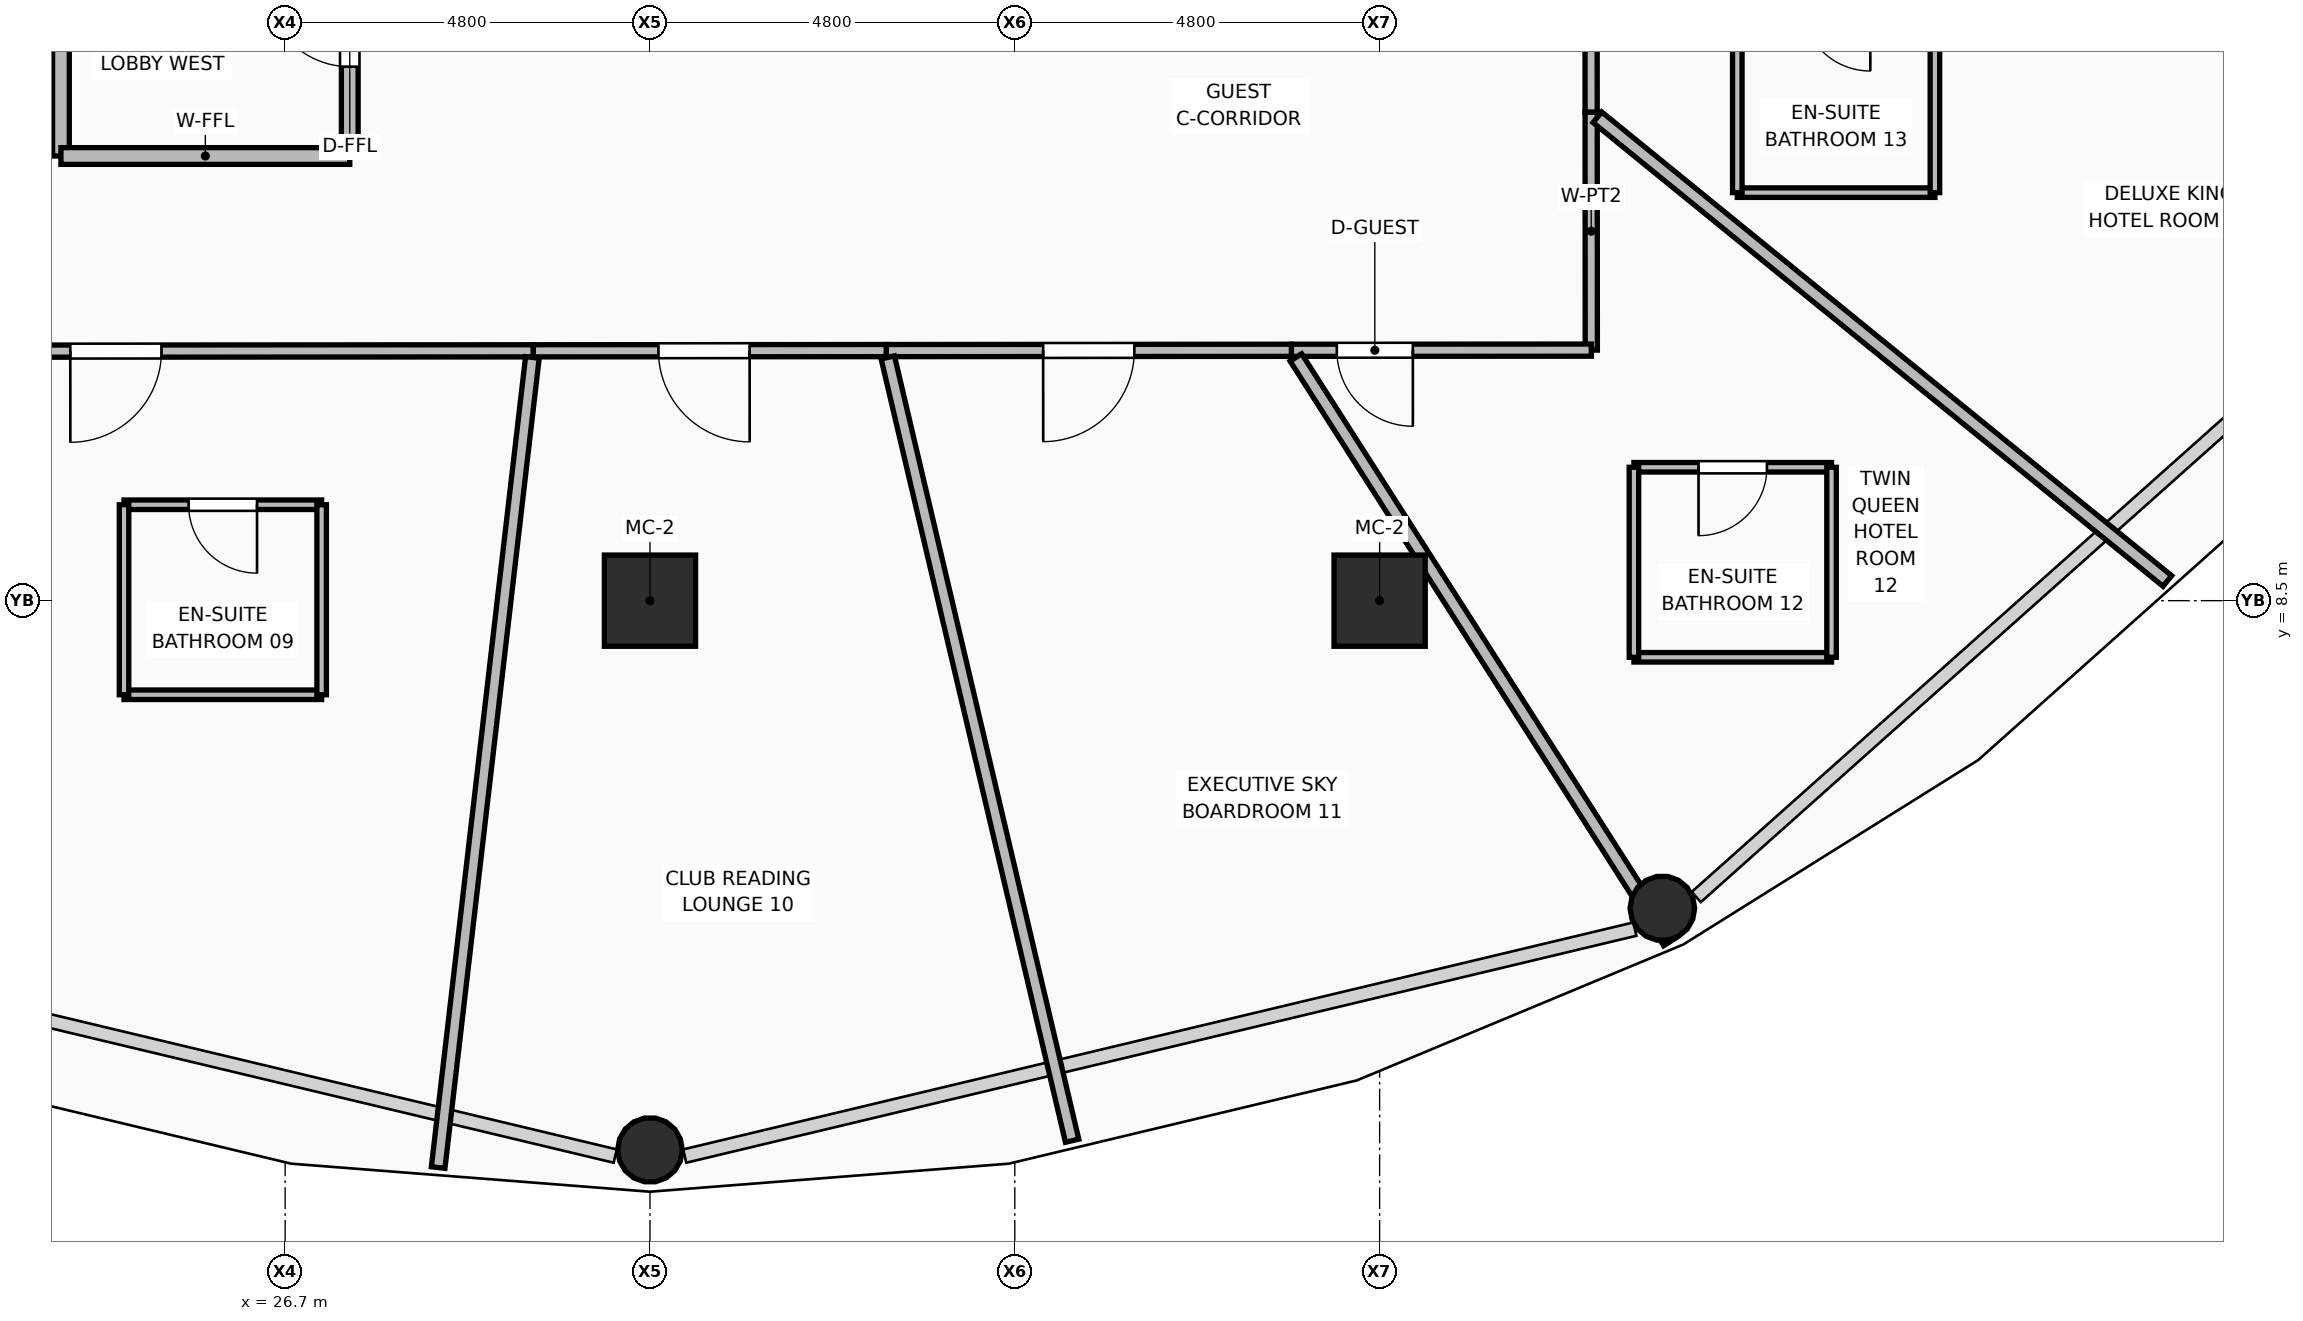
"""IFC4 building model, lengths in metres.
Left out: names, types, materials, properties, quantities, classifications, styles, units other than length and angle.
Written with IfcOpenShell. Run it as: python <this file> out.ifc"""

import sys

from ifc_helpers import new_model, si_unit, direction, frame, frame_2d, origin, origin_2d, place, context, subcontext, project, spatial, rectangle, hollow_rectangle, hollow_circle, extrude, element, fill, save


model = new_model("IFC4")
c1 = context("Model", 3, precision=1e-05, world=origin(), true_north=direction((0.0, 1.0)))
c2 = subcontext(c1, "Body", "Model", "MODEL_VIEW")
j1 = project(units=[si_unit("LENGTHUNIT", "METRE"), si_unit("PLANEANGLEUNIT", "RADIAN")], contexts=[c1])
p1 = place(None, origin())
s1 = spatial("IfcSite", under=j1, at=p1, CompositionType="ELEMENT")
p2 = place(p1, origin())
s2 = spatial("IfcBuilding", under=s1, at=p2, CompositionType="ELEMENT")
p3 = place(p2, frame((0.0, 0.0, 49.5)))
s3 = spatial("IfcBuildingStorey", under=s2, at=p3, CompositionType="ELEMENT", Elevation=49.5)
for number, where, z_axis, x_axis in (
    (1, (31.5, 8.5, 0.0), (0.0, 0.0, 1.0), (1.0, 0.0, 0.0)),
    (2, (41.1, 8.5, 0.0), (0.0, 0.0, 1.0), (1.0, 0.0, 0.0)),
):
    element("IfcColumn", number, at=place(p3, frame(where, z_axis=z_axis, x_axis=x_axis)), inside=s3, PredefinedType="COLUMN", context=c2, shape_type="SweptSolid", body=[
        extrude(hollow_rectangle(XDim=1.2, YDim=1.2, WallThickness=0.045, at=origin_2d()), origin(), (0.0, 0.0, 1.0), 3.75),
    ])
for number, where, z_axis, x_axis in (
    (3, (31.5, 1.274, 0.0), (0.0, 0.0, 1.0), (1.0, 0.0, 0.0)),
    (4, (44.82, 4.453, 0.0), (0.0, 0.0, 1.0), (1.0, 0.0, 0.0)),
):
    element("IfcColumn", number, at=place(p3, frame(where, z_axis=z_axis, x_axis=x_axis)), inside=s3, PredefinedType="COLUMN", context=c2, shape_type="SweptSolid", body=[
        extrude(hollow_circle(Radius=0.425, WallThickness=0.04, at=origin_2d()), origin(), (0.0, 0.0, 1.0), 3.57),
    ])
p4 = place(p3, frame((23.75, 14.35, 0.0), z_axis=(0.0, 0.0, 1.0), x_axis=(0.0, 1.0, 0.0)))
e5 = element("IfcWall", 5, at=p4, inside=s3, PredefinedType="PARTITIONING", context=c2, shape_type="SweptSolid", body=[
    extrude(rectangle(XDim=3.45, YDim=0.22, at=frame_2d((1.725, 0.0))), origin(), (0.0, 0.0, 1.0), 2.928),
])
p5 = place(p3, frame((23.75, 14.35, 0.0), z_axis=(0.0, 0.0, 1.0), x_axis=(1.0, 0.0, 0.0)))
e6 = element("IfcWall", 6, at=p5, inside=s3, PredefinedType="PARTITIONING", context=c2, shape_type="SweptSolid", body=[
    extrude(rectangle(XDim=3.8, YDim=0.22, at=frame_2d((1.9, 0.0))), origin(), (0.0, 0.0, 1.0), 3.55),
])
p6 = place(p3, frame((27.55, 14.35, 0.0), z_axis=(0.0, 0.0, 1.0), x_axis=(0.0, 1.0, 0.0)))
e7 = element("IfcWall", 7, at=p6, inside=s3, PredefinedType="PARTITIONING", context=c2, shape_type="SweptSolid", body=[
    extrude(rectangle(XDim=3.45, YDim=0.22, at=frame_2d((1.725, 0.0))), origin(), (0.0, 0.0, 1.0), 2.928),
])
p7 = place(p6, frame((1.175, 0.0, 0.0)))
e8 = element("IfcOpeningElement", 8, at=p7, cuts=e7, PredefinedType="OPENING", context=c2, shape_type="SweptSolid", body=[
    extrude(rectangle(XDim=1.1, YDim=2.1, at=frame_2d((0.55, 1.05))), frame((0.0, 0.12, 0.0), z_axis=(0.0, -1.0, 0.0), x_axis=(1.0, 0.0, 0.0)), (0.0, 0.0, 1.0), 0.24),
])
p8 = place(p3, frame((43.88, 20.02, 0.0), z_axis=(0.0, 0.0, 1.0), x_axis=(0.000623052839, -0.999999805903, 0.0)))
e9 = element("IfcWall", 9, at=p8, inside=s3, PredefinedType="PARTITIONING", context=c2, shape_type="SweptSolid", body=[
    extrude(rectangle(XDim=5.094, YDim=0.16, at=frame_2d((2.547, 0.0))), origin(), (0.0, 0.0, 1.0), 2.928),
])
p9 = place(p8, frame((0.595, 0.0, 0.0)))
e10 = element("IfcOpeningElement", 10, at=p9, cuts=e9, PredefinedType="OPENING", context=c2, shape_type="SweptSolid", body=[
    extrude(rectangle(XDim=1.0, YDim=2.1, at=frame_2d((0.5, 1.05))), frame((0.0, 0.09, 0.0), z_axis=(0.0, -1.0, 0.0), x_axis=(1.0, 0.0, 0.0)), (0.0, 0.0, 1.0), 0.18),
])
p10 = place(p3, frame((43.883, 14.926, 0.0), z_axis=(0.0, 0.0, 1.0), x_axis=(0.000623976167, -0.999999805327, 0.0)))
e11 = element("IfcWall", 11, at=p10, inside=s3, PredefinedType="PARTITIONING", context=c2, shape_type="SweptSolid", body=[
    extrude(rectangle(XDim=3.13, YDim=0.16, at=frame_2d((1.565, 0.0))), origin(), (0.0, 0.0, 1.0), 3.55),
])
p11 = place(p3, frame((43.885, 11.796, 0.0), z_axis=(0.0, 0.0, 1.0), x_axis=(-0.999999877509, -0.000494957559, 0.0)))
e12 = element("IfcWall", 12, at=p11, inside=s3, PredefinedType="PARTITIONING", context=c2, shape_type="SweptSolid", body=[
    extrude(rectangle(XDim=3.946, YDim=0.16, at=frame_2d((1.973, 0.0))), origin(), (0.0, 0.0, 1.0), 2.928),
])
p12 = place(p11, frame((2.348, 0.0, 0.0)))
e13 = element("IfcOpeningElement", 13, at=p12, cuts=e12, PredefinedType="OPENING", context=c2, shape_type="SweptSolid", body=[
    extrude(rectangle(XDim=1.0, YDim=2.1, at=frame_2d((0.5, 1.05))), frame((0.0, 0.09, 0.0), z_axis=(0.0, -1.0, 0.0), x_axis=(1.0, 0.0, 0.0)), (0.0, 0.0, 1.0), 0.18),
])
p13 = place(p3, frame((39.939, 11.794, 0.0), z_axis=(0.0, 0.0, 1.0), x_axis=(-0.99999973155, -0.000732734736, 0.0)))
e14 = element("IfcWall", 14, at=p13, inside=s3, PredefinedType="PARTITIONING", context=c2, shape_type="SweptSolid", body=[
    extrude(rectangle(XDim=5.331, YDim=0.16, at=frame_2d((2.666, 0.0))), origin(), (0.0, 0.0, 1.0), 3.55),
])
p14 = place(p13, frame((2.066, 0.0, 0.0)))
e15 = element("IfcOpeningElement", 15, at=p14, cuts=e14, PredefinedType="OPENING", context=c2, shape_type="SweptSolid", body=[
    extrude(rectangle(XDim=1.2, YDim=2.1, at=frame_2d((0.6, 1.05))), frame((0.0, 0.09, 0.0), z_axis=(0.0, -1.0, 0.0), x_axis=(1.0, 0.0, 0.0)), (0.0, 0.0, 1.0), 0.18),
])
p15 = place(p3, frame((34.608, 11.79, 0.0), z_axis=(0.0, 0.0, 1.0), x_axis=(-0.999999801099, -0.000630715737, 0.0)))
e16 = element("IfcWall", 16, at=p15, inside=s3, PredefinedType="PARTITIONING", context=c2, shape_type="SweptSolid", body=[
    extrude(rectangle(XDim=4.645, YDim=0.16, at=frame_2d((2.323, 0.0))), origin(), (0.0, 0.0, 1.0), 2.928),
])
p16 = place(p15, frame((1.797, 0.0, 0.0)))
e17 = element("IfcOpeningElement", 17, at=p16, cuts=e16, PredefinedType="OPENING", context=c2, shape_type="SweptSolid", body=[
    extrude(rectangle(XDim=1.2, YDim=2.1, at=frame_2d((0.6, 1.05))), frame((0.0, 0.09, 0.0), z_axis=(0.0, -1.0, 0.0), x_axis=(1.0, 0.0, 0.0)), (0.0, 0.0, 1.0), 0.18),
])
p17 = place(p3, frame((29.963, 11.787, 0.0), z_axis=(0.0, 0.0, 1.0), x_axis=(-0.999999786378, -0.000653638826, 0.0)))
e18 = element("IfcWall", 18, at=p17, inside=s3, PredefinedType="PARTITIONING", context=c2, shape_type="SweptSolid", body=[
    extrude(rectangle(XDim=10.832, YDim=0.16, at=frame_2d((5.416, 0.0))), origin(), (0.0, 0.0, 1.0), 2.928),
])
p18 = place(p17, frame((4.89, 0.0, 0.0)))
e19 = element("IfcOpeningElement", 19, at=p18, cuts=e18, PredefinedType="OPENING", context=c2, shape_type="SweptSolid", body=[
    extrude(rectangle(XDim=1.2, YDim=2.1, at=frame_2d((0.6, 1.05))), frame((0.0, 0.09, 0.0), z_axis=(0.0, -1.0, 0.0), x_axis=(1.0, 0.0, 0.0)), (0.0, 0.0, 1.0), 0.18),
])
p19 = place(p3, frame((29.953, 11.7, 0.0), z_axis=(0.0, 0.0, 1.0), x_axis=(-0.115564552906, -0.993299971867, 0.0)))
e20 = element("IfcWall", 20, at=p19, inside=s3, PredefinedType="PARTITIONING", context=c2, shape_type="SweptSolid", body=[
    extrude(rectangle(XDim=10.73, YDim=0.18, at=frame_2d((5.365, 0.0))), origin(), (0.0, 0.0, 1.0), 2.775),
])
p20 = place(p3, frame((34.629, 11.7, 0.0), z_axis=(0.0, 0.0, 1.0), x_axis=(0.229071468701, -0.973409606603, 0.0)))
e21 = element("IfcWall", 21, at=p20, inside=s3, PredefinedType="PARTITIONING", context=c2, shape_type="SweptSolid", body=[
    extrude(rectangle(XDim=10.586, YDim=0.18, at=frame_2d((5.293, 0.0))), origin(), (0.0, 0.0, 1.0), 2.775),
])
p21 = place(p3, frame((39.998, 11.7, 0.0), z_axis=(0.0, 0.0, 1.0), x_axis=(0.53849796623, -0.842626809665, 0.0)))
e22 = element("IfcWall", 22, at=p21, inside=s3, PredefinedType="PARTITIONING", context=c2, shape_type="SweptSolid", body=[
    extrude(rectangle(XDim=9.127, YDim=0.18, at=frame_2d((4.563, 0.0))), origin(), (0.0, 0.0, 1.0), 2.775),
])
p22 = place(p3, frame((43.965, 14.86, 0.0), z_axis=(0.0, 0.0, 1.0), x_axis=(0.77570287791, -0.631098284899, 0.0)))
e23 = element("IfcWall", 23, at=p22, inside=s3, PredefinedType="PARTITIONING", context=c2, shape_type="SweptSolid", body=[
    extrude(rectangle(XDim=9.667, YDim=0.18, at=frame_2d((4.834, 0.0))), origin(), (0.0, 0.0, 1.0), 2.775),
])
p23 = place(p3, frame((43.965, 19.986, 0.0), z_axis=(0.0, 0.0, 1.0), x_axis=(0.927750435419, -0.373201191827, 0.0)))
e24 = element("IfcWall", 24, at=p23, inside=s3, PredefinedType="PARTITIONING", context=c2, shape_type="SweptSolid", body=[
    extrude(rectangle(XDim=13.084, YDim=0.18, at=frame_2d((6.542, 0.0))), origin(), (0.0, 0.0, 1.0), 2.775),
])
p24 = place(p3, frame((24.58, 7.262, 0.0), z_axis=(0.0, 0.0, 1.0), x_axis=(1.0, 0.0, 0.0)))
e25 = element("IfcWall", 25, at=p24, inside=s3, PredefinedType="PARTITIONING", context=c2, shape_type="SweptSolid", body=[
    extrude(rectangle(XDim=2.6, YDim=0.125, at=frame_2d((1.3, 0.0))), origin(), (0.0, 0.0, 1.0), 3.55),
])
p25 = place(p3, frame((24.58, 9.762, 0.0), z_axis=(0.0, 0.0, 1.0), x_axis=(1.0, 0.0, 0.0)))
e26 = element("IfcWall", 26, at=p25, inside=s3, PredefinedType="PARTITIONING", context=c2, shape_type="SweptSolid", body=[
    extrude(rectangle(XDim=2.6, YDim=0.125, at=frame_2d((1.3, 0.0))), origin(), (0.0, 0.0, 1.0), 3.55),
])
p26 = place(p25, frame((0.85, 0.0, 0.0)))
e27 = element("IfcOpeningElement", 27, at=p26, cuts=e26, PredefinedType="OPENING", context=c2, shape_type="SweptSolid", body=[
    extrude(rectangle(XDim=0.9, YDim=2.1, at=frame_2d((0.45, 1.05))), frame((0.0, 0.073, 0.0), z_axis=(0.0, -1.0, 0.0), x_axis=(1.0, 0.0, 0.0)), (0.0, 0.0, 1.0), 0.145),
])
for number, where, z_axis, x_axis in (
    (28, (24.58, 7.262, 0.0), (0.0, 0.0, 1.0), (0.0, 1.0, 0.0)),
    (29, (27.18, 7.262, 0.0), (0.0, 0.0, 1.0), (0.0, 1.0, 0.0)),
):
    element("IfcWall", number, at=place(p3, frame(where, z_axis=z_axis, x_axis=x_axis)), inside=s3, PredefinedType="PARTITIONING", context=c2, shape_type="SweptSolid", body=[
        extrude(rectangle(XDim=2.5, YDim=0.125, at=frame_2d((1.25, 0.0))), origin(), (0.0, 0.0, 1.0), 3.55),
    ])
p27 = place(p3, frame((44.446, 7.755, 0.0), z_axis=(0.0, 0.0, 1.0), x_axis=(1.0, 0.0, 0.0)))
e30 = element("IfcWall", 30, at=p27, inside=s3, PredefinedType="PARTITIONING", context=c2, shape_type="SweptSolid", body=[
    extrude(rectangle(XDim=2.6, YDim=0.125, at=frame_2d((1.3, 0.0))), origin(), (0.0, 0.0, 1.0), 3.55),
])
p28 = place(p3, frame((44.446, 10.255, 0.0), z_axis=(0.0, 0.0, 1.0), x_axis=(1.0, 0.0, 0.0)))
e31 = element("IfcWall", 31, at=p28, inside=s3, PredefinedType="PARTITIONING", context=c2, shape_type="SweptSolid", body=[
    extrude(rectangle(XDim=2.6, YDim=0.125, at=frame_2d((1.3, 0.0))), origin(), (0.0, 0.0, 1.0), 3.55),
])
p29 = place(p28, frame((0.85, 0.0, 0.0)))
e32 = element("IfcOpeningElement", 32, at=p29, cuts=e31, PredefinedType="OPENING", context=c2, shape_type="SweptSolid", body=[
    extrude(rectangle(XDim=0.9, YDim=2.1, at=frame_2d((0.45, 1.05))), frame((0.0, 0.073, 0.0), z_axis=(0.0, -1.0, 0.0), x_axis=(1.0, 0.0, 0.0)), (0.0, 0.0, 1.0), 0.145),
])
for number, where, z_axis, x_axis in (
    (33, (44.446, 7.755, 0.0), (0.0, 0.0, 1.0), (0.0, 1.0, 0.0)),
    (34, (47.046, 7.755, 0.0), (0.0, 0.0, 1.0), (0.0, 1.0, 0.0)),
):
    element("IfcWall", number, at=place(p3, frame(where, z_axis=z_axis, x_axis=x_axis)), inside=s3, PredefinedType="PARTITIONING", context=c2, shape_type="SweptSolid", body=[
        extrude(rectangle(XDim=2.5, YDim=0.125, at=frame_2d((1.25, 0.0))), origin(), (0.0, 0.0, 1.0), 3.55),
    ])
p30 = place(p3, frame((45.806, 13.868, 0.0), z_axis=(0.0, 0.0, 1.0), x_axis=(1.0, 0.0, 0.0)))
e35 = element("IfcWall", 35, at=p30, inside=s3, PredefinedType="PARTITIONING", context=c2, shape_type="SweptSolid", body=[
    extrude(rectangle(XDim=2.6, YDim=0.125, at=frame_2d((1.3, 0.0))), origin(), (0.0, 0.0, 1.0), 3.55),
])
for number, where, z_axis, x_axis in (
    (36, (45.806, 13.868, 0.0), (0.0, 0.0, 1.0), (0.0, 1.0, 0.0)),
    (37, (48.406, 13.868, 0.0), (0.0, 0.0, 1.0), (0.0, 1.0, 0.0)),
):
    element("IfcWall", number, at=place(p3, frame(where, z_axis=z_axis, x_axis=x_axis)), inside=s3, PredefinedType="PARTITIONING", context=c2, shape_type="SweptSolid", body=[
        extrude(rectangle(XDim=2.5, YDim=0.125, at=frame_2d((1.25, 0.0))), origin(), (0.0, 0.0, 1.0), 2.928),
    ])
p31 = place(p7, origin())
e38 = element("IfcDoor", 38, at=p31, inside=s3, OperationType="SINGLE_SWING_RIGHT", PredefinedType="DOOR", context=c2, shape_type="SweptSolid", body=[
    extrude(rectangle(XDim=1.1, YDim=2.1, at=frame_2d((0.55, 1.05))), frame((0.0, 0.025, 0.0), z_axis=(0.0, -1.0, 0.0), x_axis=(1.0, 0.0, 0.0)), (0.0, 0.0, 1.0), 0.05),
])
fill(e8, e38)
p32 = place(p26, frame((0.9, 0.0, 0.0), z_axis=(0.0, 0.0, 1.0), x_axis=(-1.0, 0.0, 0.0)))
e39 = element("IfcDoor", 39, at=p32, inside=s3, OperationType="SINGLE_SWING_LEFT", PredefinedType="DOOR", context=c2, shape_type="SweptSolid", body=[
    extrude(rectangle(XDim=0.9, YDim=2.1, at=frame_2d((0.45, 1.05))), frame((0.0, 0.025, 0.0), z_axis=(0.0, -1.0, 0.0), x_axis=(1.0, 0.0, 0.0)), (0.0, 0.0, 1.0), 0.05),
])
fill(e27, e39)
p33 = place(p18, origin())
e40 = element("IfcDoor", 40, at=p33, inside=s3, OperationType="SINGLE_SWING_RIGHT", PredefinedType="DOOR", context=c2, shape_type="SweptSolid", body=[
    extrude(rectangle(XDim=1.2, YDim=2.1, at=frame_2d((0.6, 1.05))), frame((0.0, 0.025, 0.0), z_axis=(0.0, -1.0, 0.0), x_axis=(1.0, 0.0, 0.0)), (0.0, 0.0, 1.0), 0.05),
])
fill(e19, e40)
p34 = place(p16, origin())
e41 = element("IfcDoor", 41, at=p34, inside=s3, OperationType="SINGLE_SWING_LEFT", PredefinedType="DOOR", context=c2, shape_type="SweptSolid", body=[
    extrude(rectangle(XDim=1.2, YDim=2.1, at=frame_2d((0.6, 1.05))), frame((0.0, 0.025, 0.0), z_axis=(0.0, -1.0, 0.0), x_axis=(1.0, 0.0, 0.0)), (0.0, 0.0, 1.0), 0.05),
])
fill(e17, e41)
p35 = place(p14, origin())
e42 = element("IfcDoor", 42, at=p35, inside=s3, OperationType="SINGLE_SWING_RIGHT", PredefinedType="DOOR", context=c2, shape_type="SweptSolid", body=[
    extrude(rectangle(XDim=1.2, YDim=2.1, at=frame_2d((0.6, 1.05))), frame((0.0, 0.025, 0.0), z_axis=(0.0, -1.0, 0.0), x_axis=(1.0, 0.0, 0.0)), (0.0, 0.0, 1.0), 0.05),
])
fill(e15, e42)
p36 = place(p29, frame((0.9, 0.0, 0.0), z_axis=(0.0, 0.0, 1.0), x_axis=(-1.0, 0.0, 0.0)))
e43 = element("IfcDoor", 43, at=p36, inside=s3, OperationType="SINGLE_SWING_RIGHT", PredefinedType="DOOR", context=c2, shape_type="SweptSolid", body=[
    extrude(rectangle(XDim=0.9, YDim=2.1, at=frame_2d((0.45, 1.05))), frame((0.0, 0.025, 0.0), z_axis=(0.0, -1.0, 0.0), x_axis=(1.0, 0.0, 0.0)), (0.0, 0.0, 1.0), 0.05),
])
fill(e32, e43)
p37 = place(p12, origin())
e44 = element("IfcDoor", 44, at=p37, inside=s3, OperationType="SINGLE_SWING_LEFT", PredefinedType="DOOR", context=c2, shape_type="SweptSolid", body=[
    extrude(rectangle(XDim=1.0, YDim=2.1, at=frame_2d((0.5, 1.05))), frame((0.0, 0.025, 0.0), z_axis=(0.0, -1.0, 0.0), x_axis=(1.0, 0.0, 0.0)), (0.0, 0.0, 1.0), 0.05),
])
fill(e13, e44)
save(model, sys.argv[1])
